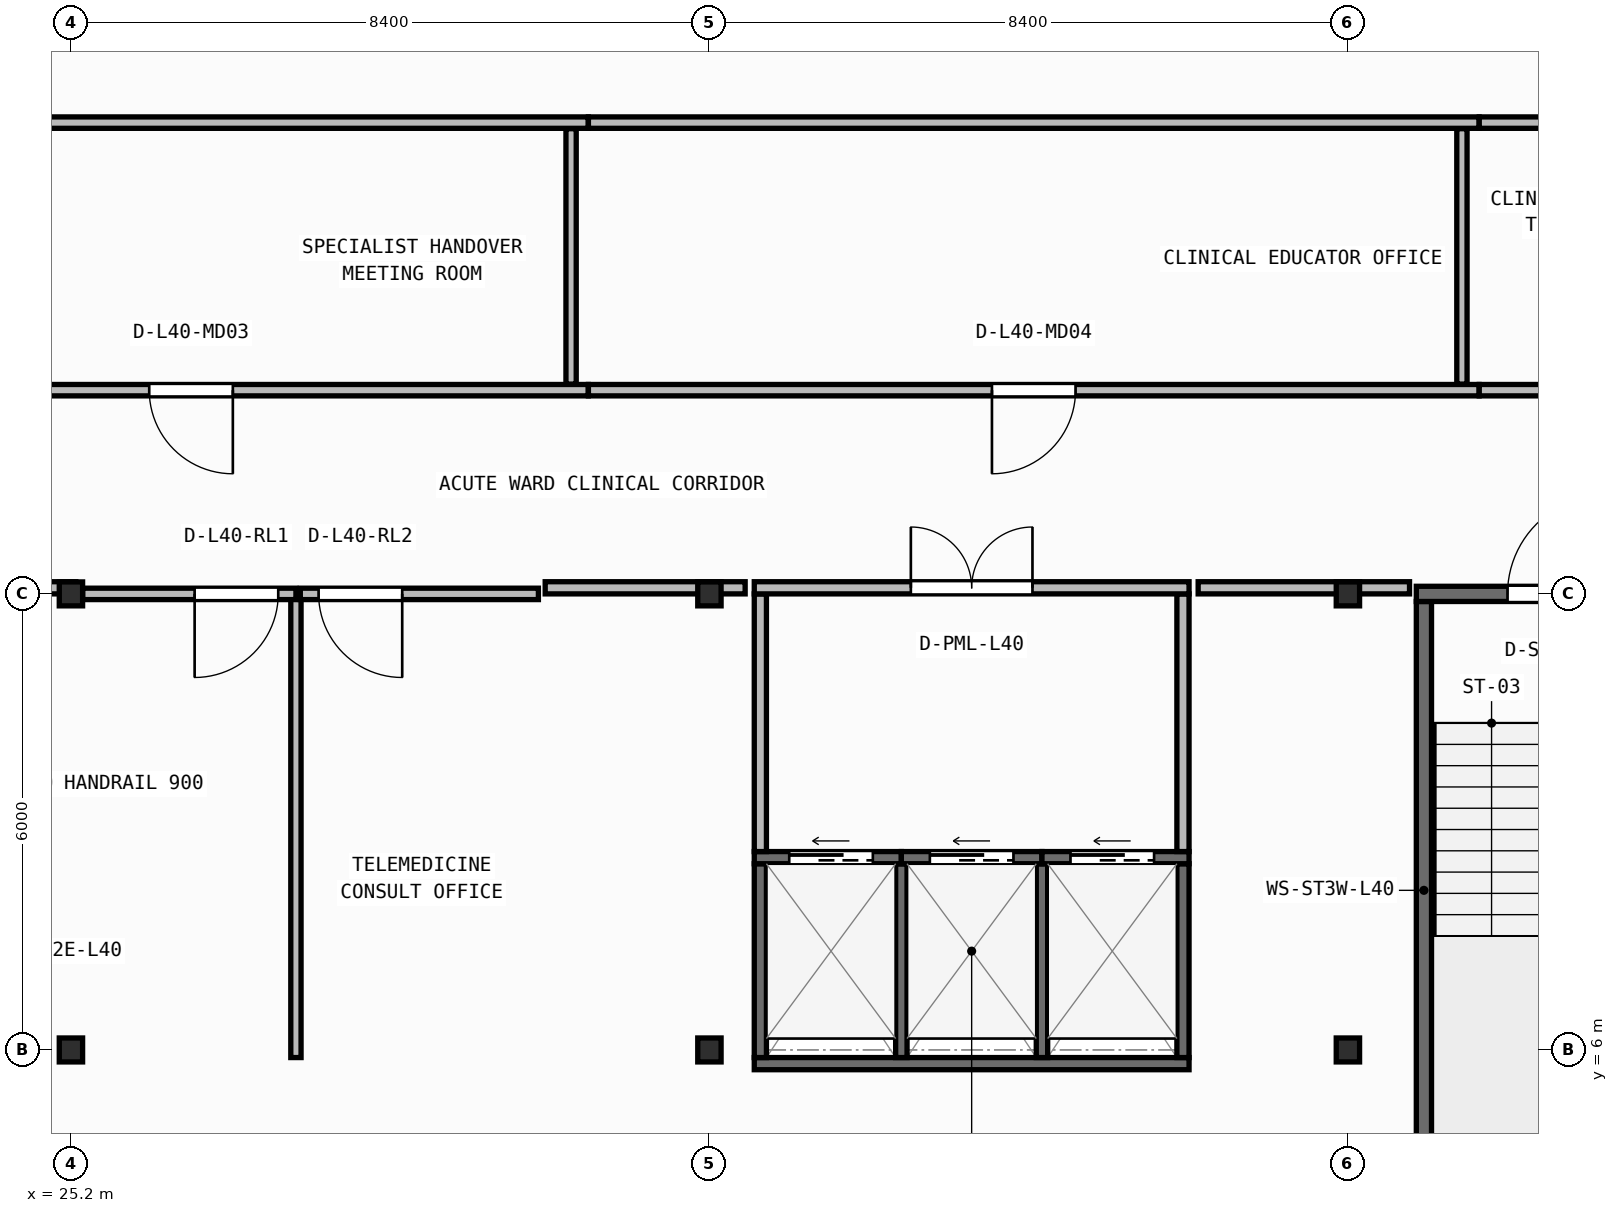
"""IFC4 building model, lengths in metres.
Left out: names, types, materials, properties, quantities, classifications, styles, units other than length and angle.
Written with IfcOpenShell. Run it as: python <this file> out.ifc"""

import sys

from ifc_helpers import new_model, si_unit, direction, frame, frame_2d, origin, origin_2d, place, context, subcontext, project, spatial, rectangle, i_section, extrude, element, fill, save


model = new_model("IFC4")
c1 = context("Model", 3, precision=1e-05, world=origin(), true_north=direction((0.0, 1.0)))
c2 = subcontext(c1, "Body", "Model", "MODEL_VIEW")
j1 = project(units=[si_unit("LENGTHUNIT", "METRE"), si_unit("PLANEANGLEUNIT", "RADIAN")], contexts=[c1])
p1 = place(None, origin())
s1 = spatial("IfcSite", under=j1, at=p1, CompositionType="ELEMENT")
p2 = place(p1, origin())
s2 = spatial("IfcBuilding", under=s1, at=p2, CompositionType="ELEMENT")
p3 = place(p2, frame((0.0, 0.0, 162.6)))
s3 = spatial("IfcBuildingStorey", under=s2, at=p3, CompositionType="ELEMENT", Elevation=162.6)
for number, where, z_axis, x_axis in (
    (1, (25.2, 6.0, 0.0), (0.0, 0.0, 1.0), (1.0, 0.0, 0.0)),
    (2, (33.6, 6.0, 0.0), (0.0, 0.0, 1.0), (1.0, 0.0, 0.0)),
    (3, (42.0, 6.0, 0.0), (0.0, 0.0, 1.0), (1.0, 0.0, 0.0)),
    (4, (25.2, 12.0, 0.0), (0.0, 0.0, 1.0), (1.0, 0.0, 0.0)),
    (5, (33.6, 12.0, 0.0), (0.0, 0.0, 1.0), (1.0, 0.0, 0.0)),
    (6, (42.0, 12.0, 0.0), (0.0, 0.0, 1.0), (1.0, 0.0, 0.0)),
):
    element("IfcColumn", number, at=place(p3, frame(where, z_axis=z_axis, x_axis=x_axis)), inside=s3, PredefinedType="COLUMN", context=c2, shape_type="SweptSolid", body=[
        extrude(i_section(OverallWidth=0.307, OverallDepth=0.315, WebThickness=0.012, FlangeThickness=0.019, FilletRadius=0.017, at=origin_2d()), origin(), (0.0, 0.0, 1.0), 3.95),
    ])
p4 = place(p3, frame((43.0, 4.3, 0.0), z_axis=(0.0, 0.0, 1.0), x_axis=(0.0, 1.0, 0.0)))
e7 = element("IfcWall", 7, at=p4, inside=s3, PredefinedType="SHEAR", context=c2, shape_type="SweptSolid", body=[
    extrude(rectangle(XDim=7.6, YDim=0.2, at=frame_2d((3.8, 0.0))), origin(), (0.0, 0.0, 1.0), 3.71),
])
p5 = place(p3, frame((42.9, 12.0, 0.0), z_axis=(0.0, 0.0, 1.0), x_axis=(1.0, 0.0, 0.0)))
e8 = element("IfcWall", 8, at=p5, inside=s3, PredefinedType="SHEAR", context=c2, shape_type="SweptSolid", body=[
    extrude(rectangle(XDim=3.7, YDim=0.2, at=frame_2d((1.85, 0.0))), origin(), (0.0, 0.0, 1.0), 3.71),
])
p6 = place(p5, frame((1.2, 0.0, 0.0)))
e9 = element("IfcOpeningElement", 9, at=p6, cuts=e8, PredefinedType="OPENING", context=c2, shape_type="SweptSolid", body=[
    extrude(rectangle(XDim=1.3, YDim=2.15, at=frame_2d((0.65, 1.075))), frame((0.0, 0.11, 0.0), z_axis=(0.0, -1.0, 0.0), x_axis=(1.0, 0.0, 0.0)), (0.0, 0.0, 1.0), 0.22),
])
p7 = place(p3, frame((34.19, 5.82, 0.0), z_axis=(0.0, 0.0, 1.0), x_axis=(1.0, 0.0, 0.0)))
e10 = element("IfcWall", 10, at=p7, inside=s3, PredefinedType="SHEAR", context=c2, shape_type="SweptSolid", body=[
    extrude(rectangle(XDim=5.72, YDim=0.16, at=frame_2d((2.86, 0.0))), origin(), (0.0, 0.0, 1.0), 3.71),
])
for number, where, z_axis, x_axis in (
    (11, (34.27, 5.9, 0.0), (0.0, 0.0, 1.0), (0.0, 1.0, 0.0)),
    (12, (39.83, 5.9, 0.0), (0.0, 0.0, 1.0), (0.0, 1.0, 0.0)),
):
    element("IfcWall", number, at=place(p3, frame(where, z_axis=z_axis, x_axis=x_axis)), inside=s3, PredefinedType="SHEAR", context=c2, shape_type="SweptSolid", body=[
        extrude(rectangle(XDim=2.55, YDim=0.16, at=frame_2d((1.275, 0.0))), origin(), (0.0, 0.0, 1.0), 3.71),
    ])
for number, where, z_axis, x_axis in (
    (13, (36.125, 5.9, 0.0), (0.0, 0.0, 1.0), (0.0, 1.0, 0.0)),
    (14, (37.975, 5.9, 0.0), (0.0, 0.0, 1.0), (0.0, 1.0, 0.0)),
):
    element("IfcWall", number, at=place(p3, frame(where, z_axis=z_axis, x_axis=x_axis)), inside=s3, PredefinedType="SHEAR", context=c2, shape_type="SweptSolid", body=[
        extrude(rectangle(XDim=2.55, YDim=0.15, at=frame_2d((1.275, 0.0))), origin(), (0.0, 0.0, 1.0), 3.71),
    ])
p8 = place(p3, frame((34.19, 8.53, 0.0), z_axis=(0.0, 0.0, 1.0), x_axis=(1.0, 0.0, 0.0)))
e15 = element("IfcWall", 15, at=p8, inside=s3, PredefinedType="SHEAR", context=c2, shape_type="SweptSolid", body=[
    extrude(rectangle(XDim=1.935, YDim=0.16, at=frame_2d((0.968, 0.0))), origin(), (0.0, 0.0, 1.0), 3.71),
])
p9 = place(p8, frame((0.46, 0.0, 0.0)))
e16 = element("IfcOpeningElement", 16, at=p9, cuts=e15, PredefinedType="OPENING", context=c2, shape_type="SweptSolid", body=[
    extrude(rectangle(XDim=1.1, YDim=2.15, at=frame_2d((0.55, 1.075))), frame((0.0, 0.09, 0.0), z_axis=(0.0, -1.0, 0.0), x_axis=(1.0, 0.0, 0.0)), (0.0, 0.0, 1.0), 0.18),
])
p10 = place(p3, frame((36.125, 8.53, 0.0), z_axis=(0.0, 0.0, 1.0), x_axis=(1.0, 0.0, 0.0)))
e17 = element("IfcWall", 17, at=p10, inside=s3, PredefinedType="SHEAR", context=c2, shape_type="SweptSolid", body=[
    extrude(rectangle(XDim=1.85, YDim=0.16, at=frame_2d((0.925, 0.0))), origin(), (0.0, 0.0, 1.0), 3.71),
])
p11 = place(p10, frame((0.375, 0.0, 0.0)))
e18 = element("IfcOpeningElement", 18, at=p11, cuts=e17, PredefinedType="OPENING", context=c2, shape_type="SweptSolid", body=[
    extrude(rectangle(XDim=1.1, YDim=2.15, at=frame_2d((0.55, 1.075))), frame((0.0, 0.09, 0.0), z_axis=(0.0, -1.0, 0.0), x_axis=(1.0, 0.0, 0.0)), (0.0, 0.0, 1.0), 0.18),
])
p12 = place(p3, frame((37.975, 8.53, 0.0), z_axis=(0.0, 0.0, 1.0), x_axis=(1.0, 0.0, 0.0)))
e19 = element("IfcWall", 19, at=p12, inside=s3, PredefinedType="SHEAR", context=c2, shape_type="SweptSolid", body=[
    extrude(rectangle(XDim=1.935, YDim=0.16, at=frame_2d((0.967, 0.0))), origin(), (0.0, 0.0, 1.0), 3.71),
])
p13 = place(p12, frame((0.375, 0.0, 0.0)))
e20 = element("IfcOpeningElement", 20, at=p13, cuts=e19, PredefinedType="OPENING", context=c2, shape_type="SweptSolid", body=[
    extrude(rectangle(XDim=1.1, YDim=2.15, at=frame_2d((0.55, 1.075))), frame((0.0, 0.09, 0.0), z_axis=(0.0, -1.0, 0.0), x_axis=(1.0, 0.0, 0.0)), (0.0, 0.0, 1.0), 0.18),
])
for number, where, z_axis, x_axis in (
    (21, (34.27, 8.61, 0.0), (0.0, 0.0, 1.0), (0.0, 1.0, 0.0)),
    (22, (39.83, 8.61, 0.0), (0.0, 0.0, 1.0), (0.0, 1.0, 0.0)),
):
    element("IfcWall", number, at=place(p3, frame(where, z_axis=z_axis, x_axis=x_axis)), inside=s3, PredefinedType="PARTITIONING", context=c2, shape_type="SweptSolid", body=[
        extrude(rectangle(XDim=3.39, YDim=0.16, at=frame_2d((1.695, 0.0))), origin(), (0.0, 0.0, 1.0), 3.71),
    ])
p14 = place(p3, frame((34.19, 12.08, 0.0), z_axis=(0.0, 0.0, 1.0), x_axis=(1.0, 0.0, 0.0)))
e23 = element("IfcWall", 23, at=p14, inside=s3, PredefinedType="PARTITIONING", context=c2, shape_type="SweptSolid", body=[
    extrude(rectangle(XDim=5.72, YDim=0.16, at=frame_2d((2.86, 0.0))), origin(), (0.0, 0.0, 1.0), 3.083),
])
p15 = place(p14, frame((2.06, 0.0, 0.0)))
e24 = element("IfcOpeningElement", 24, at=p15, cuts=e23, PredefinedType="OPENING", context=c2, shape_type="SweptSolid", body=[
    extrude(rectangle(XDim=1.6, YDim=2.05, at=frame_2d((0.8, 1.025))), frame((0.0, 0.09, 0.0), z_axis=(0.0, -1.0, 0.0), x_axis=(1.0, 0.0, 0.0)), (0.0, 0.0, 1.0), 0.18),
])
p16 = place(p3, frame((28.16, 5.9, 0.0), z_axis=(0.0, 0.0, 1.0), x_axis=(0.0, 1.0, 0.0)))
e25 = element("IfcWall", 25, at=p16, inside=s3, PredefinedType="PARTITIONING", context=c2, shape_type="SweptSolid", body=[
    extrude(rectangle(XDim=6.1, YDim=0.135, at=frame_2d((3.05, 0.0))), origin(), (0.0, 0.0, 1.0), 3.71),
])
p17 = place(p3, frame((28.16, 12.0, 0.0), z_axis=(0.0, 0.0, 1.0), x_axis=(-1.0, 0.0, 0.0)))
e26 = element("IfcWall", 26, at=p17, inside=s3, PredefinedType="PARTITIONING", context=c2, shape_type="SweptSolid", body=[
    extrude(rectangle(XDim=2.806, YDim=0.15, at=frame_2d((1.403, 0.0))), origin(), (0.0, 0.0, 1.0), 3.083),
])
p18 = place(p17, frame((0.233, 0.0, 0.0)))
e27 = element("IfcOpeningElement", 27, at=p18, cuts=e26, PredefinedType="OPENING", context=c2, shape_type="SweptSolid", body=[
    extrude(rectangle(XDim=1.1, YDim=2.1, at=frame_2d((0.55, 1.05))), frame((0.0, 0.085, 0.0), z_axis=(0.0, -1.0, 0.0), x_axis=(1.0, 0.0, 0.0)), (0.0, 0.0, 1.0), 0.17),
])
p19 = place(p3, frame((31.35, 12.0, 0.0), z_axis=(0.0, 0.0, 1.0), x_axis=(-1.0, 0.0, 0.0)))
e28 = element("IfcWall", 28, at=p19, inside=s3, PredefinedType="PARTITIONING", context=c2, shape_type="SweptSolid", body=[
    extrude(rectangle(XDim=3.133, YDim=0.15, at=frame_2d((1.566, 0.0))), origin(), (0.0, 0.0, 1.0), 3.083),
])
p20 = place(p19, frame((1.792, 0.0, 0.0)))
e29 = element("IfcOpeningElement", 29, at=p20, cuts=e28, PredefinedType="OPENING", context=c2, shape_type="SweptSolid", body=[
    extrude(rectangle(XDim=1.1, YDim=2.1, at=frame_2d((0.55, 1.05))), frame((0.0, 0.085, 0.0), z_axis=(0.0, -1.0, 0.0), x_axis=(1.0, 0.0, 0.0)), (0.0, 0.0, 1.0), 0.17),
])
p21 = place(p3, frame((32.006, 14.68, 0.0), z_axis=(0.0, 0.0, 1.0), x_axis=(-1.0, 0.0, 0.0)))
e30 = element("IfcWall", 30, at=p21, inside=s3, PredefinedType="PARTITIONING", context=c2, shape_type="SweptSolid", body=[
    extrude(rectangle(XDim=10.452, YDim=0.15, at=frame_2d((5.226, 0.0))), origin(), (0.0, 0.0, 1.0), 3.71),
])
p22 = place(p21, frame((4.676, 0.0, 0.0)))
e31 = element("IfcOpeningElement", 31, at=p22, cuts=e30, PredefinedType="OPENING", context=c2, shape_type="SweptSolid", body=[
    extrude(rectangle(XDim=1.1, YDim=2.1, at=frame_2d((0.55, 1.05))), frame((0.0, 0.085, 0.0), z_axis=(0.0, -1.0, 0.0), x_axis=(1.0, 0.0, 0.0)), (0.0, 0.0, 1.0), 0.17),
])
p23 = place(p3, frame((43.726, 14.68, 0.0), z_axis=(0.0, 0.0, 1.0), x_axis=(-1.0, 0.0, 0.0)))
e32 = element("IfcWall", 32, at=p23, inside=s3, PredefinedType="PARTITIONING", context=c2, shape_type="SweptSolid", body=[
    extrude(rectangle(XDim=11.718, YDim=0.15, at=frame_2d((5.859, 0.0))), origin(), (0.0, 0.0, 1.0), 3.71),
])
p24 = place(p23, frame((5.309, 0.0, 0.0)))
e33 = element("IfcOpeningElement", 33, at=p24, cuts=e32, PredefinedType="OPENING", context=c2, shape_type="SweptSolid", body=[
    extrude(rectangle(XDim=1.1, YDim=2.1, at=frame_2d((0.55, 1.05))), frame((0.0, 0.085, 0.0), z_axis=(0.0, -1.0, 0.0), x_axis=(1.0, 0.0, 0.0)), (0.0, 0.0, 1.0), 0.17),
])
p25 = place(p3, frame((49.396, 14.68, 0.0), z_axis=(0.0, 0.0, 1.0), x_axis=(-1.0, 0.0, 0.0)))
e34 = element("IfcWall", 34, at=p25, inside=s3, PredefinedType="PARTITIONING", context=c2, shape_type="SweptSolid", body=[
    extrude(rectangle(XDim=5.668, YDim=0.15, at=frame_2d((2.834, 0.0))), origin(), (0.0, 0.0, 1.0), 3.71),
])
p26 = place(p25, frame((2.284, 0.0, 0.0)))
e35 = element("IfcOpeningElement", 35, at=p26, cuts=e34, PredefinedType="OPENING", context=c2, shape_type="SweptSolid", body=[
    extrude(rectangle(XDim=1.1, YDim=2.1, at=frame_2d((0.55, 1.05))), frame((0.0, 0.085, 0.0), z_axis=(0.0, -1.0, 0.0), x_axis=(1.0, 0.0, 0.0)), (0.0, 0.0, 1.0), 0.17),
])
p27 = place(p3, frame((21.72, 18.2, 0.0), z_axis=(0.0, 0.0, 1.0), x_axis=(1.0, 0.0, 0.0)))
e36 = element("IfcWall", 36, at=p27, inside=s3, PredefinedType="PARTITIONING", context=c2, shape_type="SweptSolid", body=[
    extrude(rectangle(XDim=10.286, YDim=0.15, at=frame_2d((5.143, 0.0))), origin(), (0.0, 0.0, 1.0), 3.71),
])
p28 = place(p3, frame((32.008, 18.2, 0.0), z_axis=(0.0, 0.0, 1.0), x_axis=(1.0, 0.0, 0.0)))
e37 = element("IfcWall", 37, at=p28, inside=s3, PredefinedType="PARTITIONING", context=c2, shape_type="SweptSolid", body=[
    extrude(rectangle(XDim=11.718, YDim=0.15, at=frame_2d((5.859, 0.0))), origin(), (0.0, 0.0, 1.0), 3.71),
])
p29 = place(p3, frame((43.728, 18.2, 0.0), z_axis=(0.0, 0.0, 1.0), x_axis=(1.0, 0.0, 0.0)))
e38 = element("IfcWall", 38, at=p29, inside=s3, PredefinedType="PARTITIONING", context=c2, shape_type="SweptSolid", body=[
    extrude(rectangle(XDim=5.668, YDim=0.15, at=frame_2d((2.834, 0.0))), origin(), (0.0, 0.0, 1.0), 3.71),
])
for number, where, z_axis, x_axis in (
    (39, (31.78, 14.76, 0.0), (0.0, 0.0, 1.0), (0.0, 1.0, 0.0)),
    (40, (43.5, 14.76, 0.0), (0.0, 0.0, 1.0), (0.0, 1.0, 0.0)),
):
    element("IfcWall", number, at=place(p3, frame(where, z_axis=z_axis, x_axis=x_axis)), inside=s3, PredefinedType="PARTITIONING", context=c2, shape_type="SweptSolid", body=[
        extrude(rectangle(XDim=3.36, YDim=0.135, at=frame_2d((1.68, 0.0))), origin(), (0.0, 0.0, 1.0), 3.71),
    ])
p30 = place(p3, frame((24.02, 12.08, 0.0), z_axis=(0.0, 0.0, 1.0), x_axis=(1.0, 0.0, 0.0)))
e41 = element("IfcWall", 41, at=p30, inside=s3, PredefinedType="PARTITIONING", context=c2, shape_type="SweptSolid", body=[
    extrude(rectangle(XDim=1.244, YDim=0.16, at=frame_2d((0.622, 0.0))), origin(), (0.0, 0.0, 1.0), 3.083),
])
p31 = place(p3, frame((31.439, 12.08, 0.0), z_axis=(0.0, 0.0, 1.0), x_axis=(1.0, 0.0, 0.0)))
e42 = element("IfcWall", 42, at=p31, inside=s3, PredefinedType="PARTITIONING", context=c2, shape_type="SweptSolid", body=[
    extrude(rectangle(XDim=2.631, YDim=0.16, at=frame_2d((1.315, 0.0))), origin(), (0.0, 0.0, 1.0), 3.083),
])
p32 = place(p3, frame((40.03, 12.08, 0.0), z_axis=(0.0, 0.0, 1.0), x_axis=(1.0, 0.0, 0.0)))
e43 = element("IfcWall", 43, at=p32, inside=s3, PredefinedType="PARTITIONING", context=c2, shape_type="SweptSolid", body=[
    extrude(rectangle(XDim=2.781, YDim=0.16, at=frame_2d((1.39, 0.0))), origin(), (0.0, 0.0, 1.0), 3.083),
])
p33 = place(p6, origin())
e44 = element("IfcDoor", 44, at=p33, inside=s3, OperationType="SINGLE_SWING_RIGHT", PredefinedType="DOOR", context=c2, shape_type="SweptSolid", body=[
    extrude(rectangle(XDim=1.3, YDim=2.15, at=frame_2d((0.65, 1.075))), frame((0.0, 0.025, 0.0), z_axis=(0.0, -1.0, 0.0), x_axis=(1.0, 0.0, 0.0)), (0.0, 0.0, 1.0), 0.05),
])
fill(e9, e44)
p34 = place(p9, origin())
e45 = element("IfcDoor", 45, at=p34, inside=s3, OperationType="SLIDING_TO_LEFT", PredefinedType="DOOR", context=c2, shape_type="SweptSolid", body=[
    extrude(rectangle(XDim=1.1, YDim=2.15, at=frame_2d((0.55, 1.075))), frame((0.0, 0.025, 0.0), z_axis=(0.0, -1.0, 0.0), x_axis=(1.0, 0.0, 0.0)), (0.0, 0.0, 1.0), 0.05),
])
fill(e16, e45)
p35 = place(p11, origin())
e46 = element("IfcDoor", 46, at=p35, inside=s3, OperationType="SLIDING_TO_LEFT", PredefinedType="DOOR", context=c2, shape_type="SweptSolid", body=[
    extrude(rectangle(XDim=1.1, YDim=2.15, at=frame_2d((0.55, 1.075))), frame((0.0, 0.025, 0.0), z_axis=(0.0, -1.0, 0.0), x_axis=(1.0, 0.0, 0.0)), (0.0, 0.0, 1.0), 0.05),
])
fill(e18, e46)
p36 = place(p13, origin())
e47 = element("IfcDoor", 47, at=p36, inside=s3, OperationType="SLIDING_TO_LEFT", PredefinedType="DOOR", context=c2, shape_type="SweptSolid", body=[
    extrude(rectangle(XDim=1.1, YDim=2.15, at=frame_2d((0.55, 1.075))), frame((0.0, 0.025, 0.0), z_axis=(0.0, -1.0, 0.0), x_axis=(1.0, 0.0, 0.0)), (0.0, 0.0, 1.0), 0.05),
])
fill(e20, e47)
p37 = place(p15, origin())
e48 = element("IfcDoor", 48, at=p37, inside=s3, OperationType="DOUBLE_DOOR_SINGLE_SWING", PredefinedType="DOOR", context=c2, shape_type="SweptSolid", body=[
    extrude(rectangle(XDim=1.6, YDim=2.05, at=frame_2d((0.8, 1.025))), frame((0.0, 0.025, 0.0), z_axis=(0.0, -1.0, 0.0), x_axis=(1.0, 0.0, 0.0)), (0.0, 0.0, 1.0), 0.05),
])
fill(e24, e48)
p38 = place(p18, origin())
e49 = element("IfcDoor", 49, at=p38, inside=s3, OperationType="SINGLE_SWING_RIGHT", PredefinedType="DOOR", context=c2, shape_type="SweptSolid", body=[
    extrude(rectangle(XDim=1.1, YDim=2.1, at=frame_2d((0.55, 1.05))), frame((0.0, 0.025, 0.0), z_axis=(0.0, -1.0, 0.0), x_axis=(1.0, 0.0, 0.0)), (0.0, 0.0, 1.0), 0.05),
])
fill(e27, e49)
p39 = place(p20, origin())
e50 = element("IfcDoor", 50, at=p39, inside=s3, OperationType="SINGLE_SWING_LEFT", PredefinedType="DOOR", context=c2, shape_type="SweptSolid", body=[
    extrude(rectangle(XDim=1.1, YDim=2.1, at=frame_2d((0.55, 1.05))), frame((0.0, 0.025, 0.0), z_axis=(0.0, -1.0, 0.0), x_axis=(1.0, 0.0, 0.0)), (0.0, 0.0, 1.0), 0.05),
])
fill(e29, e50)
p40 = place(p22, origin())
e51 = element("IfcDoor", 51, at=p40, inside=s3, OperationType="SINGLE_SWING_LEFT", PredefinedType="DOOR", context=c2, shape_type="SweptSolid", body=[
    extrude(rectangle(XDim=1.1, YDim=2.1, at=frame_2d((0.55, 1.05))), frame((0.0, 0.025, 0.0), z_axis=(0.0, -1.0, 0.0), x_axis=(1.0, 0.0, 0.0)), (0.0, 0.0, 1.0), 0.05),
])
fill(e31, e51)
p41 = place(p24, origin())
e52 = element("IfcDoor", 52, at=p41, inside=s3, OperationType="SINGLE_SWING_RIGHT", PredefinedType="DOOR", context=c2, shape_type="SweptSolid", body=[
    extrude(rectangle(XDim=1.1, YDim=2.1, at=frame_2d((0.55, 1.05))), frame((0.0, 0.025, 0.0), z_axis=(0.0, -1.0, 0.0), x_axis=(1.0, 0.0, 0.0)), (0.0, 0.0, 1.0), 0.05),
])
fill(e33, e52)
save(model, sys.argv[1])
